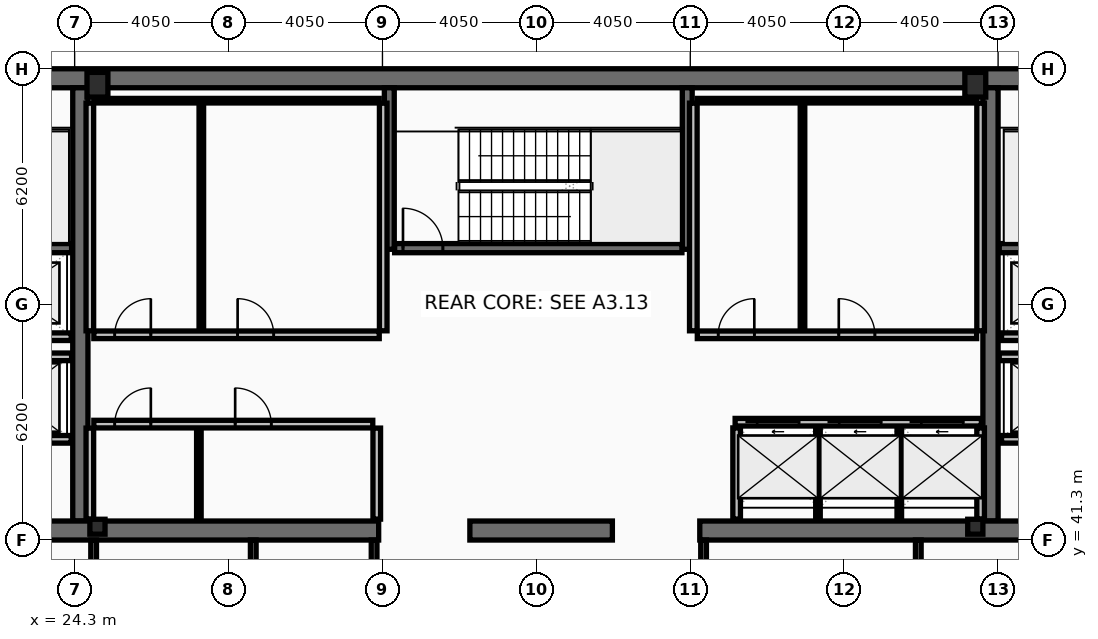
"""IFC4 building model, lengths in metres.
Left out: names, types, materials, properties, quantities, classifications, styles, units other than length and angle.
Written with IfcOpenShell. Run it as: python <this file> out.ifc"""

import sys

from ifc_helpers import new_model, si_unit, direction, frame, frame_2d, origin, origin_2d, place, context, subcontext, project, spatial, rectangle, hollow_rectangle, i_section, extrude, element, fill, save


model = new_model("IFC4")
c1 = context("Model", 3, precision=1e-05, world=origin(), true_north=direction((0.0, 1.0)))
c2 = subcontext(c1, "Body", "Model", "MODEL_VIEW")
j1 = project(units=[si_unit("LENGTHUNIT", "METRE"), si_unit("PLANEANGLEUNIT", "RADIAN")], contexts=[c1])
p1 = place(None, origin())
s1 = spatial("IfcSite", under=j1, at=p1, CompositionType="ELEMENT")
p2 = place(p1, origin())
s2 = spatial("IfcBuilding", under=s1, at=p2, CompositionType="ELEMENT")
p3 = place(p2, frame((0.0, 0.0, 310.2)))
s3 = spatial("IfcBuildingStorey", under=s2, at=p3, CompositionType="ELEMENT", Elevation=310.2)
p4 = place(p3, frame((16.2, 53.45, 0.0), z_axis=(0.0, 0.0, 1.0), x_axis=(1.0, 0.0, 0.0)))
e1 = element("IfcWall", 1, at=p4, inside=s3, PredefinedType="SHEAR", context=c2, shape_type="SweptSolid", body=[
    extrude(rectangle(XDim=40.5, YDim=0.5, at=frame_2d((20.25, 0.0))), origin(), (0.0, 0.0, 1.0), 4.24),
])
for number, where, z_axis, x_axis in (
    (2, (24.45, 41.8, 0.0), (0.0, 0.0, 1.0), (0.0, 1.0, 0.0)),
    (3, (48.4, 41.8, 0.0), (0.0, 0.0, 1.0), (0.0, 1.0, 0.0)),
):
    element("IfcWall", number, at=place(p3, frame(where, z_axis=z_axis, x_axis=x_axis)), inside=s3, PredefinedType="SHEAR", context=c2, shape_type="SweptSolid", body=[
        extrude(rectangle(XDim=11.4, YDim=0.4, at=frame_2d((5.7, 0.0))), origin(), (0.0, 0.0, 1.0), 4.24),
    ])
p5 = place(p3, frame((32.3, 41.55, 0.0), z_axis=(0.0, 0.0, 1.0), x_axis=(-1.0, 0.0, 0.0)))
e4 = element("IfcWall", 4, at=p5, inside=s3, PredefinedType="SHEAR", context=c2, shape_type="SweptSolid", body=[
    extrude(rectangle(XDim=11.45, YDim=0.5, at=frame_2d((5.725, 0.0))), origin(), (0.0, 0.0, 1.0), 4.24),
])
p6 = place(p3, frame((38.45, 41.55, 0.0), z_axis=(0.0, 0.0, 1.0), x_axis=(-1.0, 0.0, 0.0)))
e5 = element("IfcWall", 5, at=p6, inside=s3, PredefinedType="SHEAR", context=c2, shape_type="SweptSolid", body=[
    extrude(rectangle(XDim=3.75, YDim=0.5, at=frame_2d((1.875, 0.0))), origin(), (0.0, 0.0, 1.0), 4.24),
])
p7 = place(p3, frame((52.05, 41.55, 0.0), z_axis=(0.0, 0.0, 1.0), x_axis=(-1.0, 0.0, 0.0)))
e6 = element("IfcWall", 6, at=p7, inside=s3, PredefinedType="SHEAR", context=c2, shape_type="SweptSolid", body=[
    extrude(rectangle(XDim=11.3, YDim=0.5, at=frame_2d((5.65, 0.0))), origin(), (0.0, 0.0, 1.0), 4.24),
])
for number, where, z_axis, x_axis in (
    (7, (32.58, 48.95, 0.0), (0.0, 0.0, 1.0), (0.0, 1.0, 0.0)),
    (8, (40.42, 48.95, 0.0), (0.0, 0.0, 1.0), (0.0, 1.0, 0.0)),
):
    element("IfcWall", number, at=place(p3, frame(where, z_axis=z_axis, x_axis=x_axis)), inside=s3, PredefinedType="SHEAR", context=c2, shape_type="SweptSolid", body=[
        extrude(rectangle(XDim=4.25, YDim=0.26, at=frame_2d((2.125, 0.0))), origin(), (0.0, 0.0, 1.0), 4.24),
    ])
p8 = place(p3, frame((16.7, 48.98, 0.0), z_axis=(0.0, 0.0, 1.0), x_axis=(1.0, 0.0, 0.0)))
e9 = element("IfcWall", 9, at=p8, inside=s3, PredefinedType="SHEAR", context=c2, shape_type="SweptSolid", body=[
    extrude(rectangle(XDim=7.52, YDim=0.24, at=frame_2d((3.76, 0.0))), origin(), (0.0, 0.0, 1.0), 4.24),
])
p9 = place(p8, frame((0.22, 0.0, 0.0)))
e10 = element("IfcOpeningElement", 10, at=p9, cuts=e9, PredefinedType="OPENING", context=c2, shape_type="SweptSolid", body=[
    extrude(rectangle(XDim=1.05, YDim=2.15, at=frame_2d((0.525, 1.075))), frame((0.0, 0.13, 0.0), z_axis=(0.0, -1.0, 0.0), x_axis=(1.0, 0.0, 0.0)), (0.0, 0.0, 1.0), 0.26),
])
p10 = place(p3, frame((48.63, 48.98, 0.0), z_axis=(0.0, 0.0, 1.0), x_axis=(1.0, 0.0, 0.0)))
e11 = element("IfcWall", 11, at=p10, inside=s3, PredefinedType="SHEAR", context=c2, shape_type="SweptSolid", body=[
    extrude(rectangle(XDim=7.57, YDim=0.24, at=frame_2d((3.785, 0.0))), origin(), (0.0, 0.0, 1.0), 4.24),
])
p11 = place(p10, frame((6.3, 0.0, 0.0)))
e12 = element("IfcOpeningElement", 12, at=p11, cuts=e11, PredefinedType="OPENING", context=c2, shape_type="SweptSolid", body=[
    extrude(rectangle(XDim=1.05, YDim=2.15, at=frame_2d((0.525, 1.075))), frame((0.0, 0.13, 0.0), z_axis=(0.0, -1.0, 0.0), x_axis=(1.0, 0.0, 0.0)), (0.0, 0.0, 1.0), 0.26),
])
p12 = place(p3, frame((32.72, 48.98, 0.0), z_axis=(0.0, 0.0, 1.0), x_axis=(1.0, 0.0, 0.0)))
e13 = element("IfcWall", 13, at=p12, inside=s3, PredefinedType="SHEAR", context=c2, shape_type="SweptSolid", body=[
    extrude(rectangle(XDim=7.56, YDim=0.24, at=frame_2d((3.78, 0.0))), origin(), (0.0, 0.0, 1.0), 4.24),
])
p13 = place(p12, frame((0.22, 0.0, 0.0)))
e14 = element("IfcOpeningElement", 14, at=p13, cuts=e13, PredefinedType="OPENING", context=c2, shape_type="SweptSolid", body=[
    extrude(rectangle(XDim=1.05, YDim=2.15, at=frame_2d((0.525, 1.075))), frame((0.0, 0.13, 0.0), z_axis=(0.0, -1.0, 0.0), x_axis=(1.0, 0.0, 0.0)), (0.0, 0.0, 1.0), 0.26),
])
for number, where, z_axis, x_axis in (
    (15, (24.9, 53.28, 0.0), (0.0, 0.0, 1.0), (1.0, 0.0, 0.0)),
    (16, (48.0, 53.28, 0.0), (0.0, 0.0, 1.0), (1.0, 0.0, 0.0)),
):
    element("IfcColumn", number, at=place(p3, frame(where, z_axis=z_axis, x_axis=x_axis)), inside=s3, PredefinedType="COLUMN", context=c2, shape_type="SweptSolid", body=[
        extrude(hollow_rectangle(XDim=0.55, YDim=0.65, WallThickness=0.04, at=origin_2d()), origin(), (0.0, 0.0, 1.0), 4.4),
    ])
for number, where, z_axis, x_axis in (
    (17, (24.9, 41.65, 0.0), (0.0, 0.0, 1.0), (1.0, 0.0, 0.0)),
    (18, (48.0, 41.65, 0.0), (0.0, 0.0, 1.0), (1.0, 0.0, 0.0)),
):
    element("IfcColumn", number, at=place(p3, frame(where, z_axis=z_axis, x_axis=x_axis)), inside=s3, PredefinedType="COLUMN", context=c2, shape_type="SweptSolid", body=[
        extrude(i_section(OverallWidth=0.399, OverallDepth=0.393, WebThickness=0.023, FlangeThickness=0.037, at=origin_2d()), origin(), (0.0, 0.0, 1.0), 4.4),
    ])
p14 = place(p3, frame((41.68, 44.4, 0.0), z_axis=(0.0, 0.0, 1.0), x_axis=(1.0, 0.0, 0.0)))
e19 = element("IfcWall", 19, at=p14, inside=s3, PredefinedType="PARTITIONING", context=c2, shape_type="SweptSolid", body=[
    extrude(rectangle(XDim=6.48, YDim=0.2, at=frame_2d((3.24, 0.0))), origin(), (0.0, 0.0, 1.0), 4.24),
])
p15 = place(p14, frame((0.58, 0.0, 0.0)))
e20 = element("IfcOpeningElement", 20, at=p15, cuts=e19, PredefinedType="OPENING", context=c2, shape_type="SweptSolid", body=[
    extrude(rectangle(XDim=1.1, YDim=2.18, at=frame_2d((0.55, 1.09))), frame((0.0, 0.11, 0.0), z_axis=(0.0, -1.0, 0.0), x_axis=(1.0, 0.0, 0.0)), (0.0, 0.0, 1.0), 0.22),
])
p16 = place(p14, frame((2.74, 0.0, 0.0)))
e21 = element("IfcOpeningElement", 21, at=p16, cuts=e19, PredefinedType="OPENING", context=c2, shape_type="SweptSolid", body=[
    extrude(rectangle(XDim=1.1, YDim=2.18, at=frame_2d((0.55, 1.09))), frame((0.0, 0.11, 0.0), z_axis=(0.0, -1.0, 0.0), x_axis=(1.0, 0.0, 0.0)), (0.0, 0.0, 1.0), 0.22),
])
p17 = place(p14, frame((4.9, 0.0, 0.0)))
e22 = element("IfcOpeningElement", 22, at=p17, cuts=e19, PredefinedType="OPENING", context=c2, shape_type="SweptSolid", body=[
    extrude(rectangle(XDim=1.1, YDim=2.18, at=frame_2d((0.55, 1.09))), frame((0.0, 0.11, 0.0), z_axis=(0.0, -1.0, 0.0), x_axis=(1.0, 0.0, 0.0)), (0.0, 0.0, 1.0), 0.22),
])
p18 = place(p3, frame((51.61, 43.95, 0.0), z_axis=(0.0, 0.0, 1.0), x_axis=(-1.0, 0.0, 0.0)))
e23 = element("IfcWall", 23, at=p18, inside=s3, PredefinedType="PARTITIONING", context=c2, shape_type="SweptSolid", body=[
    extrude(rectangle(XDim=2.92, YDim=0.2, at=frame_2d((1.46, 0.0))), origin(), (0.0, 0.0, 1.0), 4.24),
])
p19 = place(p18, frame((0.81, 0.0, 0.0)))
e24 = element("IfcOpeningElement", 24, at=p19, cuts=e23, PredefinedType="OPENING", context=c2, shape_type="SweptSolid", body=[
    extrude(rectangle(XDim=1.3, YDim=2.18, at=frame_2d((0.65, 1.09))), frame((0.0, 0.11, 0.0), z_axis=(0.0, -1.0, 0.0), x_axis=(1.0, 0.0, 0.0)), (0.0, 0.0, 1.0), 0.22),
])
p20 = place(p3, frame((24.21, 43.95, 0.0), z_axis=(0.0, 0.0, 1.0), x_axis=(-1.0, 0.0, 0.0)))
e25 = element("IfcWall", 25, at=p20, inside=s3, PredefinedType="PARTITIONING", context=c2, shape_type="SweptSolid", body=[
    extrude(rectangle(XDim=2.97, YDim=0.2, at=frame_2d((1.485, 0.0))), origin(), (0.0, 0.0, 1.0), 4.24),
])
p21 = place(p20, frame((0.86, 0.0, 0.0)))
e26 = element("IfcOpeningElement", 26, at=p21, cuts=e25, PredefinedType="OPENING", context=c2, shape_type="SweptSolid", body=[
    extrude(rectangle(XDim=1.3, YDim=2.18, at=frame_2d((0.65, 1.09))), frame((0.0, 0.11, 0.0), z_axis=(0.0, -1.0, 0.0), x_axis=(1.0, 0.0, 0.0)), (0.0, 0.0, 1.0), 0.22),
])
p22 = place(p3, frame((51.61, 46.65, 0.0), z_axis=(0.0, 0.0, 1.0), x_axis=(-1.0, 0.0, 0.0)))
e27 = element("IfcWall", 27, at=p22, inside=s3, PredefinedType="PARTITIONING", context=c2, shape_type="SweptSolid", body=[
    extrude(rectangle(XDim=2.92, YDim=0.2, at=frame_2d((1.46, 0.0))), origin(), (0.0, 0.0, 1.0), 4.24),
])
p23 = place(p22, frame((0.86, 0.0, 0.0)))
e28 = element("IfcOpeningElement", 28, at=p23, cuts=e27, PredefinedType="OPENING", context=c2, shape_type="SweptSolid", body=[
    extrude(rectangle(XDim=1.2, YDim=2.18, at=frame_2d((0.6, 1.09))), frame((0.0, 0.11, 0.0), z_axis=(0.0, -1.0, 0.0), x_axis=(1.0, 0.0, 0.0)), (0.0, 0.0, 1.0), 0.22),
])
p24 = place(p3, frame((24.21, 46.65, 0.0), z_axis=(0.0, 0.0, 1.0), x_axis=(-1.0, 0.0, 0.0)))
e29 = element("IfcWall", 29, at=p24, inside=s3, PredefinedType="PARTITIONING", context=c2, shape_type="SweptSolid", body=[
    extrude(rectangle(XDim=2.97, YDim=0.2, at=frame_2d((1.485, 0.0))), origin(), (0.0, 0.0, 1.0), 4.24),
])
p25 = place(p24, frame((0.91, 0.0, 0.0)))
e30 = element("IfcOpeningElement", 30, at=p25, cuts=e29, PredefinedType="OPENING", context=c2, shape_type="SweptSolid", body=[
    extrude(rectangle(XDim=1.2, YDim=2.18, at=frame_2d((0.6, 1.09))), frame((0.0, 0.11, 0.0), z_axis=(0.0, -1.0, 0.0), x_axis=(1.0, 0.0, 0.0)), (0.0, 0.0, 1.0), 0.22),
])
p26 = place(p3, frame((21.2, 46.12, 0.0), z_axis=(0.0, 0.0, 1.0), x_axis=(1.0, 0.0, 0.0)))
e31 = element("IfcWall", 31, at=p26, inside=s3, PredefinedType="PARTITIONING", context=c2, shape_type="SweptSolid", body=[
    extrude(rectangle(XDim=3.02, YDim=0.2, at=frame_2d((1.51, 0.0))), origin(), (0.0, 0.0, 1.0), 4.24),
])
p27 = place(p3, frame((48.63, 46.12, 0.0), z_axis=(0.0, 0.0, 1.0), x_axis=(1.0, 0.0, 0.0)))
e32 = element("IfcWall", 32, at=p27, inside=s3, PredefinedType="PARTITIONING", context=c2, shape_type="SweptSolid", body=[
    extrude(rectangle(XDim=3.07, YDim=0.2, at=frame_2d((1.535, 0.0))), origin(), (0.0, 0.0, 1.0), 4.24),
])
for number, where, z_axis, x_axis in (
    (33, (24.7, 46.805, 0.0), (0.0, 0.0, 1.0), (0.0, 1.0, 0.0)),
    (34, (32.42, 46.805, 0.0), (0.0, 0.0, 1.0), (0.0, 1.0, 0.0)),
):
    element("IfcWall", number, at=place(p3, frame(where, z_axis=z_axis, x_axis=x_axis)), inside=s3, PredefinedType="PARTITIONING", context=c2, shape_type="SweptSolid", body=[
        extrude(rectangle(XDim=5.99, YDim=0.2, at=frame_2d((2.995, 0.0))), origin(), (0.0, 0.0, 1.0), 4.24),
    ])
p28 = place(p3, frame((24.805, 52.86, 0.0), z_axis=(0.0, 0.0, 1.0), x_axis=(1.0, 0.0, 0.0)))
e35 = element("IfcWall", 35, at=p28, inside=s3, PredefinedType="PARTITIONING", context=c2, shape_type="SweptSolid", body=[
    extrude(rectangle(XDim=7.51, YDim=0.12, at=frame_2d((3.755, 0.0))), origin(), (0.0, 0.0, 1.0), 4.24),
])
p29 = place(p3, frame((27.634, 46.805, 0.0), z_axis=(0.0, 0.0, 1.0), x_axis=(0.0, 1.0, 0.0)))
e36 = element("IfcWall", 36, at=p29, inside=s3, PredefinedType="PARTITIONING", context=c2, shape_type="SweptSolid", body=[
    extrude(rectangle(XDim=5.99, YDim=0.12, at=frame_2d((2.995, 0.0))), origin(), (0.0, 0.0, 1.0), 4.24),
])
p30 = place(p3, frame((24.805, 46.7, 0.0), z_axis=(0.0, 0.0, 1.0), x_axis=(1.0, 0.0, 0.0)))
e37 = element("IfcWall", 37, at=p30, inside=s3, PredefinedType="PARTITIONING", context=c2, shape_type="SweptSolid", body=[
    extrude(rectangle(XDim=7.51, YDim=0.2, at=frame_2d((3.755, 0.0))), origin(), (0.0, 0.0, 1.0), 4.24),
])
p31 = place(p30, frame((0.55, 0.0, 0.0)))
e38 = element("IfcOpeningElement", 38, at=p31, cuts=e37, PredefinedType="OPENING", context=c2, shape_type="SweptSolid", body=[
    extrude(rectangle(XDim=0.95, YDim=2.1, at=frame_2d((0.475, 1.05))), frame((0.0, 0.11, 0.0), z_axis=(0.0, -1.0, 0.0), x_axis=(1.0, 0.0, 0.0)), (0.0, 0.0, 1.0), 0.22),
])
p32 = place(p30, frame((3.784, 0.0, 0.0)))
e39 = element("IfcOpeningElement", 39, at=p32, cuts=e37, PredefinedType="OPENING", context=c2, shape_type="SweptSolid", body=[
    extrude(rectangle(XDim=0.95, YDim=2.1, at=frame_2d((0.475, 1.05))), frame((0.0, 0.11, 0.0), z_axis=(0.0, -1.0, 0.0), x_axis=(1.0, 0.0, 0.0)), (0.0, 0.0, 1.0), 0.22),
])
for number, where, z_axis, x_axis in (
    (40, (24.7, 41.85, 0.0), (0.0, 0.0, 1.0), (0.0, 1.0, 0.0)),
    (41, (32.25, 41.85, 0.0), (0.0, 0.0, 1.0), (0.0, 1.0, 0.0)),
):
    element("IfcWall", number, at=place(p3, frame(where, z_axis=z_axis, x_axis=x_axis)), inside=s3, PredefinedType="PARTITIONING", context=c2, shape_type="SweptSolid", body=[
        extrude(rectangle(XDim=2.395, YDim=0.2, at=frame_2d((1.198, 0.0))), origin(), (0.0, 0.0, 1.0), 4.24),
    ])
p33 = place(p3, frame((27.569, 41.85, 0.0), z_axis=(0.0, 0.0, 1.0), x_axis=(0.0, 1.0, 0.0)))
e42 = element("IfcWall", 42, at=p33, inside=s3, PredefinedType="PARTITIONING", context=c2, shape_type="SweptSolid", body=[
    extrude(rectangle(XDim=2.395, YDim=0.12, at=frame_2d((1.198, 0.0))), origin(), (0.0, 0.0, 1.0), 4.24),
])
p34 = place(p3, frame((24.805, 44.35, 0.0), z_axis=(0.0, 0.0, 1.0), x_axis=(1.0, 0.0, 0.0)))
e43 = element("IfcWall", 43, at=p34, inside=s3, PredefinedType="PARTITIONING", context=c2, shape_type="SweptSolid", body=[
    extrude(rectangle(XDim=7.34, YDim=0.2, at=frame_2d((3.67, 0.0))), origin(), (0.0, 0.0, 1.0), 4.24),
])
p35 = place(p34, frame((0.55, 0.0, 0.0)))
e44 = element("IfcOpeningElement", 44, at=p35, cuts=e43, PredefinedType="OPENING", context=c2, shape_type="SweptSolid", body=[
    extrude(rectangle(XDim=0.95, YDim=2.1, at=frame_2d((0.475, 1.05))), frame((0.0, 0.11, 0.0), z_axis=(0.0, -1.0, 0.0), x_axis=(1.0, 0.0, 0.0)), (0.0, 0.0, 1.0), 0.22),
])
p36 = place(p34, frame((3.719, 0.0, 0.0)))
e45 = element("IfcOpeningElement", 45, at=p36, cuts=e43, PredefinedType="OPENING", context=c2, shape_type="SweptSolid", body=[
    extrude(rectangle(XDim=0.95, YDim=2.1, at=frame_2d((0.475, 1.05))), frame((0.0, 0.11, 0.0), z_axis=(0.0, -1.0, 0.0), x_axis=(1.0, 0.0, 0.0)), (0.0, 0.0, 1.0), 0.22),
])
for number, where, z_axis, x_axis in (
    (46, (40.58, 46.805, 0.0), (0.0, 0.0, 1.0), (0.0, 1.0, 0.0)),
    (47, (48.14, 46.805, 0.0), (0.0, 0.0, 1.0), (0.0, 1.0, 0.0)),
):
    element("IfcWall", number, at=place(p3, frame(where, z_axis=z_axis, x_axis=x_axis)), inside=s3, PredefinedType="PARTITIONING", context=c2, shape_type="SweptSolid", body=[
        extrude(rectangle(XDim=5.99, YDim=0.2, at=frame_2d((2.995, 0.0))), origin(), (0.0, 0.0, 1.0), 4.24),
    ])
p37 = place(p3, frame((40.685, 52.86, 0.0), z_axis=(0.0, 0.0, 1.0), x_axis=(1.0, 0.0, 0.0)))
e48 = element("IfcWall", 48, at=p37, inside=s3, PredefinedType="PARTITIONING", context=c2, shape_type="SweptSolid", body=[
    extrude(rectangle(XDim=7.35, YDim=0.12, at=frame_2d((3.675, 0.0))), origin(), (0.0, 0.0, 1.0), 4.24),
])
p38 = place(p3, frame((43.453, 46.805, 0.0), z_axis=(0.0, 0.0, 1.0), x_axis=(0.0, 1.0, 0.0)))
e49 = element("IfcWall", 49, at=p38, inside=s3, PredefinedType="PARTITIONING", context=c2, shape_type="SweptSolid", body=[
    extrude(rectangle(XDim=5.99, YDim=0.12, at=frame_2d((2.995, 0.0))), origin(), (0.0, 0.0, 1.0), 4.24),
])
p39 = place(p3, frame((40.685, 46.7, 0.0), z_axis=(0.0, 0.0, 1.0), x_axis=(1.0, 0.0, 0.0)))
e50 = element("IfcWall", 50, at=p39, inside=s3, PredefinedType="PARTITIONING", context=c2, shape_type="SweptSolid", body=[
    extrude(rectangle(XDim=7.35, YDim=0.2, at=frame_2d((3.675, 0.0))), origin(), (0.0, 0.0, 1.0), 4.24),
])
p40 = place(p39, frame((0.55, 0.0, 0.0)))
e51 = element("IfcOpeningElement", 51, at=p40, cuts=e50, PredefinedType="OPENING", context=c2, shape_type="SweptSolid", body=[
    extrude(rectangle(XDim=0.95, YDim=2.1, at=frame_2d((0.475, 1.05))), frame((0.0, 0.11, 0.0), z_axis=(0.0, -1.0, 0.0), x_axis=(1.0, 0.0, 0.0)), (0.0, 0.0, 1.0), 0.22),
])
p41 = place(p39, frame((3.723, 0.0, 0.0)))
e52 = element("IfcOpeningElement", 52, at=p41, cuts=e50, PredefinedType="OPENING", context=c2, shape_type="SweptSolid", body=[
    extrude(rectangle(XDim=0.95, YDim=2.1, at=frame_2d((0.475, 1.05))), frame((0.0, 0.11, 0.0), z_axis=(0.0, -1.0, 0.0), x_axis=(1.0, 0.0, 0.0)), (0.0, 0.0, 1.0), 0.22),
])
for number, where, z_axis, x_axis in (
    (53, (41.72, 41.85, 0.0), (0.0, 0.0, 1.0), (0.0, 1.0, 0.0)),
    (54, (48.14, 41.85, 0.0), (0.0, 0.0, 1.0), (0.0, 1.0, 0.0)),
):
    element("IfcWall", number, at=place(p3, frame(where, z_axis=z_axis, x_axis=x_axis)), inside=s3, PredefinedType="PARTITIONING", context=c2, shape_type="SweptSolid", body=[
        extrude(rectangle(XDim=2.4, YDim=0.2, at=frame_2d((1.2, 0.0))), origin(), (0.0, 0.0, 1.0), 4.24),
    ])
for number, where, z_axis, x_axis in (
    (55, (43.86, 41.85, 0.0), (0.0, 0.0, 1.0), (0.0, 1.0, 0.0)),
    (56, (46.0, 41.85, 0.0), (0.0, 0.0, 1.0), (0.0, 1.0, 0.0)),
):
    element("IfcWall", number, at=place(p3, frame(where, z_axis=z_axis, x_axis=x_axis)), inside=s3, PredefinedType="PARTITIONING", context=c2, shape_type="SweptSolid", body=[
        extrude(rectangle(XDim=2.4, YDim=0.12, at=frame_2d((1.2, 0.0))), origin(), (0.0, 0.0, 1.0), 4.24),
    ])
p42 = place(p3, frame((24.8, 38.28, 0.0), z_axis=(0.0, 0.0, 1.0), x_axis=(0.0, 1.0, 0.0)))
e57 = element("IfcWall", 57, at=p42, inside=s3, PredefinedType="PARTITIONING", context=c2, shape_type="SweptSolid", body=[
    extrude(rectangle(XDim=3.02, YDim=0.15, at=frame_2d((1.51, 0.0))), origin(), (0.0, 0.0, 1.0), 3.63),
])
for number, where, z_axis, x_axis in (
    (58, (29.0, 38.28, 0.0), (0.0, 0.0, 1.0), (0.0, 1.0, 0.0)),
    (59, (32.18, 38.28, 0.0), (0.0, 0.0, 1.0), (0.0, 1.0, 0.0)),
    (60, (40.85, 38.28, 0.0), (0.0, 0.0, 1.0), (0.0, 1.0, 0.0)),
    (61, (46.5, 38.28, 0.0), (0.0, 0.0, 1.0), (0.0, 1.0, 0.0)),
):
    element("IfcWall", number, at=place(p3, frame(where, z_axis=z_axis, x_axis=x_axis)), inside=s3, PredefinedType="PARTITIONING", context=c2, shape_type="SweptSolid", body=[
        extrude(rectangle(XDim=3.02, YDim=0.15, at=frame_2d((1.51, 0.0))), origin(), (0.0, 0.0, 1.0), 4.24),
    ])
p43 = place(p13, origin())
e62 = element("IfcDoor", 62, at=p43, inside=s3, OperationType="SINGLE_SWING_LEFT", PredefinedType="DOOR", context=c2, shape_type="SweptSolid", body=[
    extrude(rectangle(XDim=1.05, YDim=2.15, at=frame_2d((0.525, 1.075))), frame((0.0, 0.025, 0.0), z_axis=(0.0, -1.0, 0.0), x_axis=(1.0, 0.0, 0.0)), (0.0, 0.0, 1.0), 0.05),
])
fill(e14, e62)
p44 = place(p15, origin())
e63 = element("IfcDoor", 63, at=p44, inside=s3, OperationType="SLIDING_TO_LEFT", PredefinedType="DOOR", context=c2, shape_type="SweptSolid", body=[
    extrude(rectangle(XDim=1.1, YDim=2.18, at=frame_2d((0.55, 1.09))), frame((0.0, 0.025, 0.0), z_axis=(0.0, -1.0, 0.0), x_axis=(1.0, 0.0, 0.0)), (0.0, 0.0, 1.0), 0.05),
])
fill(e20, e63)
p45 = place(p16, origin())
e64 = element("IfcDoor", 64, at=p45, inside=s3, OperationType="SLIDING_TO_LEFT", PredefinedType="DOOR", context=c2, shape_type="SweptSolid", body=[
    extrude(rectangle(XDim=1.1, YDim=2.18, at=frame_2d((0.55, 1.09))), frame((0.0, 0.025, 0.0), z_axis=(0.0, -1.0, 0.0), x_axis=(1.0, 0.0, 0.0)), (0.0, 0.0, 1.0), 0.05),
])
fill(e21, e64)
p46 = place(p17, origin())
e65 = element("IfcDoor", 65, at=p46, inside=s3, OperationType="SLIDING_TO_LEFT", PredefinedType="DOOR", context=c2, shape_type="SweptSolid", body=[
    extrude(rectangle(XDim=1.1, YDim=2.18, at=frame_2d((0.55, 1.09))), frame((0.0, 0.025, 0.0), z_axis=(0.0, -1.0, 0.0), x_axis=(1.0, 0.0, 0.0)), (0.0, 0.0, 1.0), 0.05),
])
fill(e22, e65)
p47 = place(p31, origin())
e66 = element("IfcDoor", 66, at=p47, inside=s3, OperationType="SINGLE_SWING_RIGHT", PredefinedType="DOOR", context=c2, shape_type="SweptSolid", body=[
    extrude(rectangle(XDim=0.95, YDim=2.1, at=frame_2d((0.475, 1.05))), frame((0.0, 0.025, 0.0), z_axis=(0.0, -1.0, 0.0), x_axis=(1.0, 0.0, 0.0)), (0.0, 0.0, 1.0), 0.05),
])
fill(e38, e66)
p48 = place(p32, origin())
e67 = element("IfcDoor", 67, at=p48, inside=s3, OperationType="SINGLE_SWING_LEFT", PredefinedType="DOOR", context=c2, shape_type="SweptSolid", body=[
    extrude(rectangle(XDim=0.95, YDim=2.1, at=frame_2d((0.475, 1.05))), frame((0.0, 0.025, 0.0), z_axis=(0.0, -1.0, 0.0), x_axis=(1.0, 0.0, 0.0)), (0.0, 0.0, 1.0), 0.05),
])
fill(e39, e67)
p49 = place(p35, origin())
e68 = element("IfcDoor", 68, at=p49, inside=s3, OperationType="SINGLE_SWING_RIGHT", PredefinedType="DOOR", context=c2, shape_type="SweptSolid", body=[
    extrude(rectangle(XDim=0.95, YDim=2.1, at=frame_2d((0.475, 1.05))), frame((0.0, 0.025, 0.0), z_axis=(0.0, -1.0, 0.0), x_axis=(1.0, 0.0, 0.0)), (0.0, 0.0, 1.0), 0.05),
])
fill(e44, e68)
p50 = place(p36, origin())
e69 = element("IfcDoor", 69, at=p50, inside=s3, OperationType="SINGLE_SWING_LEFT", PredefinedType="DOOR", context=c2, shape_type="SweptSolid", body=[
    extrude(rectangle(XDim=0.95, YDim=2.1, at=frame_2d((0.475, 1.05))), frame((0.0, 0.025, 0.0), z_axis=(0.0, -1.0, 0.0), x_axis=(1.0, 0.0, 0.0)), (0.0, 0.0, 1.0), 0.05),
])
fill(e45, e69)
p51 = place(p40, origin())
e70 = element("IfcDoor", 70, at=p51, inside=s3, OperationType="SINGLE_SWING_RIGHT", PredefinedType="DOOR", context=c2, shape_type="SweptSolid", body=[
    extrude(rectangle(XDim=0.95, YDim=2.1, at=frame_2d((0.475, 1.05))), frame((0.0, 0.025, 0.0), z_axis=(0.0, -1.0, 0.0), x_axis=(1.0, 0.0, 0.0)), (0.0, 0.0, 1.0), 0.05),
])
fill(e51, e70)
p52 = place(p41, origin())
e71 = element("IfcDoor", 71, at=p52, inside=s3, OperationType="SINGLE_SWING_LEFT", PredefinedType="DOOR", context=c2, shape_type="SweptSolid", body=[
    extrude(rectangle(XDim=0.95, YDim=2.1, at=frame_2d((0.475, 1.05))), frame((0.0, 0.025, 0.0), z_axis=(0.0, -1.0, 0.0), x_axis=(1.0, 0.0, 0.0)), (0.0, 0.0, 1.0), 0.05),
])
fill(e52, e71)
save(model, sys.argv[1])
